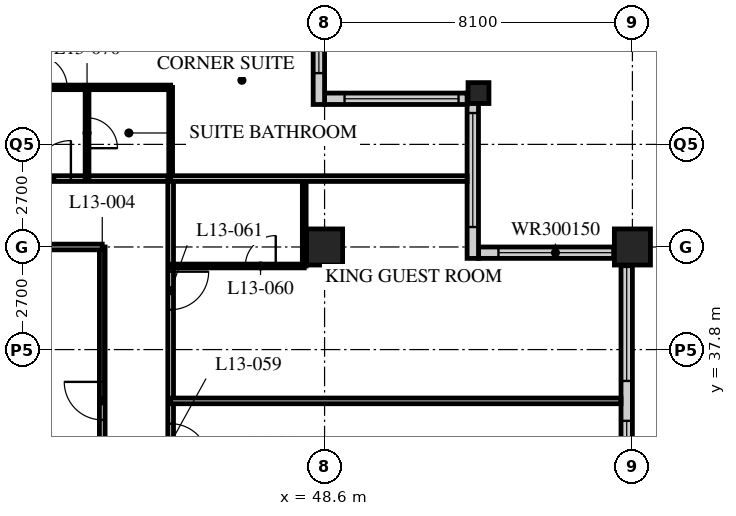
"""IFC4 building model, lengths in metres.
Left out: names, types, materials, properties, quantities, classifications, styles, units other than length and angle.
Written with IfcOpenShell. Run it as: python <this file> out.ifc"""

import sys

from ifc_helpers import new_model, si_unit, direction, frame, frame_2d, origin, origin_2d, place, context, subcontext, project, spatial, rectangle, hollow_rectangle, extrude, element, fill, save


model = new_model("IFC4")
c1 = context("Model", 3, precision=1e-05, world=origin(), true_north=direction((0.0, 1.0)))
c2 = subcontext(c1, "Body", "Model", "MODEL_VIEW")
j1 = project(units=[si_unit("LENGTHUNIT", "METRE"), si_unit("PLANEANGLEUNIT", "RADIAN")], contexts=[c1])
p1 = place(None, origin())
s1 = spatial("IfcSite", under=j1, at=p1, CompositionType="ELEMENT")
p2 = place(p1, origin())
s2 = spatial("IfcBuilding", under=s1, at=p2, CompositionType="ELEMENT")
p3 = place(p2, frame((0.0, 0.0, 56.8)))
s3 = spatial("IfcBuildingStorey", under=s2, at=p3, CompositionType="ELEMENT", Elevation=56.8)
p4 = place(p3, frame((48.6, 40.5, 0.0), z_axis=(0.0, 0.0, 1.0), x_axis=(1.0, 0.0, 0.0)))
e1 = element("IfcColumn", 1, at=p4, inside=s3, PredefinedType="COLUMN", context=c2, shape_type="SweptSolid", body=[
    extrude(hollow_rectangle(XDim=0.95, YDim=0.95, WallThickness=0.095, at=origin_2d()), origin(), (0.0, 0.0, 1.0), 3.4),
])
p5 = place(p3, frame((52.65, 44.55, 0.0), z_axis=(0.0, 0.0, 1.0), x_axis=(1.0, 0.0, 0.0)))
e2 = element("IfcColumn", 2, at=p5, inside=s3, PredefinedType="COLUMN", context=c2, shape_type="SweptSolid", body=[
    extrude(hollow_rectangle(XDim=0.55, YDim=0.55, WallThickness=0.05, at=origin_2d()), origin(), (0.0, 0.0, 1.0), 3.4),
])
p6 = place(p3, frame((56.7, 40.5, 0.0), z_axis=(0.0, 0.0, 1.0), x_axis=(1.0, 0.0, 0.0)))
e3 = element("IfcColumn", 3, at=p6, inside=s3, PredefinedType="COLUMN", context=c2, shape_type="SweptSolid", body=[
    extrude(hollow_rectangle(XDim=0.95, YDim=0.95, WallThickness=0.095, at=origin_2d()), origin(), (0.0, 0.0, 1.0), 3.4),
])
p7 = place(p3, frame((56.55, 8.4, 0.0), z_axis=(0.0, 0.0, 1.0), x_axis=(0.0, 1.0, 0.0)))
e4 = element("IfcWall", 4, at=p7, inside=s3, PredefinedType="SOLIDWALL", context=c2, shape_type="SweptSolid", body=[
    extrude(rectangle(XDim=32.1, YDim=0.3, at=frame_2d((16.05, 0.0))), origin(), (0.0, 0.0, 1.0), 3.19),
])
p8 = place(p7, frame((0.225, 0.0, 0.9)))
e5 = element("IfcOpeningElement", 5, at=p8, cuts=e4, PredefinedType="OPENING", context=c2, shape_type="SweptSolid", body=[
    extrude(rectangle(XDim=3.0, YDim=2.0, at=frame_2d((1.5, 1.0))), frame((0.0, 0.16, 0.0), z_axis=(0.0, -1.0, 0.0), x_axis=(1.0, 0.0, 0.0)), (0.0, 0.0, 1.0), 0.32),
])
p9 = place(p7, frame((4.275, 0.0, 0.9)))
e6 = element("IfcOpeningElement", 6, at=p9, cuts=e4, PredefinedType="OPENING", context=c2, shape_type="SweptSolid", body=[
    extrude(rectangle(XDim=3.0, YDim=2.0, at=frame_2d((1.5, 1.0))), frame((0.0, 0.16, 0.0), z_axis=(0.0, -1.0, 0.0), x_axis=(1.0, 0.0, 0.0)), (0.0, 0.0, 1.0), 0.32),
])
p10 = place(p7, frame((8.325, 0.0, 0.9)))
e7 = element("IfcOpeningElement", 7, at=p10, cuts=e4, PredefinedType="OPENING", context=c2, shape_type="SweptSolid", body=[
    extrude(rectangle(XDim=3.0, YDim=2.0, at=frame_2d((1.5, 1.0))), frame((0.0, 0.16, 0.0), z_axis=(0.0, -1.0, 0.0), x_axis=(1.0, 0.0, 0.0)), (0.0, 0.0, 1.0), 0.32),
])
p11 = place(p7, frame((12.375, 0.0, 0.9)))
e8 = element("IfcOpeningElement", 8, at=p11, cuts=e4, PredefinedType="OPENING", context=c2, shape_type="SweptSolid", body=[
    extrude(rectangle(XDim=3.0, YDim=2.0, at=frame_2d((1.5, 1.0))), frame((0.0, 0.16, 0.0), z_axis=(0.0, -1.0, 0.0), x_axis=(1.0, 0.0, 0.0)), (0.0, 0.0, 1.0), 0.32),
])
p12 = place(p7, frame((16.425, 0.0, 0.9)))
e9 = element("IfcOpeningElement", 9, at=p12, cuts=e4, PredefinedType="OPENING", context=c2, shape_type="SweptSolid", body=[
    extrude(rectangle(XDim=3.0, YDim=2.0, at=frame_2d((1.5, 1.0))), frame((0.0, 0.16, 0.0), z_axis=(0.0, -1.0, 0.0), x_axis=(1.0, 0.0, 0.0)), (0.0, 0.0, 1.0), 0.32),
])
p13 = place(p7, frame((20.475, 0.0, 0.9)))
e10 = element("IfcOpeningElement", 10, at=p13, cuts=e4, PredefinedType="OPENING", context=c2, shape_type="SweptSolid", body=[
    extrude(rectangle(XDim=3.0, YDim=2.0, at=frame_2d((1.5, 1.0))), frame((0.0, 0.16, 0.0), z_axis=(0.0, -1.0, 0.0), x_axis=(1.0, 0.0, 0.0)), (0.0, 0.0, 1.0), 0.32),
])
p14 = place(p7, frame((24.525, 0.0, 0.9)))
e11 = element("IfcOpeningElement", 11, at=p14, cuts=e4, PredefinedType="OPENING", context=c2, shape_type="SweptSolid", body=[
    extrude(rectangle(XDim=3.0, YDim=2.0, at=frame_2d((1.5, 1.0))), frame((0.0, 0.16, 0.0), z_axis=(0.0, -1.0, 0.0), x_axis=(1.0, 0.0, 0.0)), (0.0, 0.0, 1.0), 0.32),
])
p15 = place(p7, frame((28.575, 0.0, 0.9)))
e12 = element("IfcOpeningElement", 12, at=p15, cuts=e4, PredefinedType="OPENING", context=c2, shape_type="SweptSolid", body=[
    extrude(rectangle(XDim=3.0, YDim=2.0, at=frame_2d((1.5, 1.0))), frame((0.0, 0.16, 0.0), z_axis=(0.0, -1.0, 0.0), x_axis=(1.0, 0.0, 0.0)), (0.0, 0.0, 1.0), 0.32),
])
p16 = place(p3, frame((56.4, 40.35, 0.0), z_axis=(0.0, 0.0, 1.0), x_axis=(-1.0, 0.0, 0.0)))
e13 = element("IfcWall", 13, at=p16, inside=s3, PredefinedType="SOLIDWALL", context=c2, shape_type="SweptSolid", body=[
    extrude(rectangle(XDim=3.75, YDim=0.3, at=frame_2d((1.875, 0.0))), origin(), (0.0, 0.0, 1.0), 3.19),
])
p17 = place(p16, frame((0.225, 0.0, 0.9)))
e14 = element("IfcOpeningElement", 14, at=p17, cuts=e13, PredefinedType="OPENING", context=c2, shape_type="SweptSolid", body=[
    extrude(rectangle(XDim=3.0, YDim=1.5, at=frame_2d((1.5, 0.75))), frame((0.0, 0.16, 0.0), z_axis=(0.0, -1.0, 0.0), x_axis=(1.0, 0.0, 0.0)), (0.0, 0.0, 1.0), 0.32),
])
p18 = place(p3, frame((52.5, 40.2, 0.0), z_axis=(0.0, 0.0, 1.0), x_axis=(0.0, 1.0, 0.0)))
e15 = element("IfcWall", 15, at=p18, inside=s3, PredefinedType="SOLIDWALL", context=c2, shape_type="SweptSolid", body=[
    extrude(rectangle(XDim=4.35, YDim=0.3, at=frame_2d((2.175, 0.0))), origin(), (0.0, 0.0, 1.0), 3.19),
])
p19 = place(p18, frame((0.825, 0.0, 0.9)))
e16 = element("IfcOpeningElement", 16, at=p19, cuts=e15, PredefinedType="OPENING", context=c2, shape_type="SweptSolid", body=[
    extrude(rectangle(XDim=3.0, YDim=1.5, at=frame_2d((1.5, 0.75))), frame((0.0, 0.16, 0.0), z_axis=(0.0, -1.0, 0.0), x_axis=(1.0, 0.0, 0.0)), (0.0, 0.0, 1.0), 0.32),
])
p20 = place(p3, frame((52.35, 44.4, 0.0), z_axis=(0.0, 0.0, 1.0), x_axis=(-1.0, 0.0, 0.0)))
e17 = element("IfcWall", 17, at=p20, inside=s3, PredefinedType="SOLIDWALL", context=c2, shape_type="SweptSolid", body=[
    extrude(rectangle(XDim=3.75, YDim=0.3, at=frame_2d((1.875, 0.0))), origin(), (0.0, 0.0, 1.0), 3.19),
])
p21 = place(p20, frame((0.225, 0.0, 0.9)))
e18 = element("IfcOpeningElement", 18, at=p21, cuts=e17, PredefinedType="OPENING", context=c2, shape_type="SweptSolid", body=[
    extrude(rectangle(XDim=3.0, YDim=1.5, at=frame_2d((1.5, 0.75))), frame((0.0, 0.16, 0.0), z_axis=(0.0, -1.0, 0.0), x_axis=(1.0, 0.0, 0.0)), (0.0, 0.0, 1.0), 0.32),
])
p22 = place(p3, frame((48.45, 44.25, 0.0), z_axis=(0.0, 0.0, 1.0), x_axis=(0.0, 1.0, 0.0)))
e19 = element("IfcWall", 19, at=p22, inside=s3, PredefinedType="SOLIDWALL", context=c2, shape_type="SweptSolid", body=[
    extrude(rectangle(XDim=4.35, YDim=0.3, at=frame_2d((2.175, 0.0))), origin(), (0.0, 0.0, 1.0), 3.19),
])
p23 = place(p22, frame((0.825, 0.0, 0.9)))
e20 = element("IfcOpeningElement", 20, at=p23, cuts=e19, PredefinedType="OPENING", context=c2, shape_type="SweptSolid", body=[
    extrude(rectangle(XDim=3.0, YDim=1.5, at=frame_2d((1.5, 0.75))), frame((0.0, 0.16, 0.0), z_axis=(0.0, -1.0, 0.0), x_axis=(1.0, 0.0, 0.0)), (0.0, 0.0, 1.0), 0.32),
])
p24 = place(p3, frame((12.15, 42.3, 0.0), z_axis=(0.0, 0.0, 1.0), x_axis=(1.0, 0.0, 0.0)))
e21 = element("IfcWall", 21, at=p24, inside=s3, PredefinedType="PARTITIONING", context=c2, shape_type="SweptSolid", body=[
    extrude(rectangle(XDim=32.4, YDim=0.15, at=frame_2d((16.2, 0.0))), origin(), (0.0, 0.0, 1.0), 3.19),
])
p25 = place(p24, frame((6.5, 0.0, 0.0)))
e22 = element("IfcOpeningElement", 22, at=p25, cuts=e21, PredefinedType="OPENING", context=c2, shape_type="SweptSolid", body=[
    extrude(rectangle(XDim=1.0, YDim=2.1, at=frame_2d((0.5, 1.05))), frame((0.0, 0.085, 0.0), z_axis=(0.0, -1.0, 0.0), x_axis=(1.0, 0.0, 0.0)), (0.0, 0.0, 1.0), 0.17),
])
p26 = place(p24, frame((10.55, 0.0, 0.0)))
e23 = element("IfcOpeningElement", 23, at=p26, cuts=e21, PredefinedType="OPENING", context=c2, shape_type="SweptSolid", body=[
    extrude(rectangle(XDim=1.0, YDim=2.1, at=frame_2d((0.5, 1.05))), frame((0.0, 0.085, 0.0), z_axis=(0.0, -1.0, 0.0), x_axis=(1.0, 0.0, 0.0)), (0.0, 0.0, 1.0), 0.17),
])
p27 = place(p24, frame((14.6, 0.0, 0.0)))
e24 = element("IfcOpeningElement", 24, at=p27, cuts=e21, PredefinedType="OPENING", context=c2, shape_type="SweptSolid", body=[
    extrude(rectangle(XDim=1.0, YDim=2.1, at=frame_2d((0.5, 1.05))), frame((0.0, 0.085, 0.0), z_axis=(0.0, -1.0, 0.0), x_axis=(1.0, 0.0, 0.0)), (0.0, 0.0, 1.0), 0.17),
])
p28 = place(p24, frame((18.65, 0.0, 0.0)))
e25 = element("IfcOpeningElement", 25, at=p28, cuts=e21, PredefinedType="OPENING", context=c2, shape_type="SweptSolid", body=[
    extrude(rectangle(XDim=1.0, YDim=2.1, at=frame_2d((0.5, 1.05))), frame((0.0, 0.085, 0.0), z_axis=(0.0, -1.0, 0.0), x_axis=(1.0, 0.0, 0.0)), (0.0, 0.0, 1.0), 0.17),
])
p29 = place(p24, frame((22.7, 0.0, 0.0)))
e26 = element("IfcOpeningElement", 26, at=p29, cuts=e21, PredefinedType="OPENING", context=c2, shape_type="SweptSolid", body=[
    extrude(rectangle(XDim=1.0, YDim=2.1, at=frame_2d((0.5, 1.05))), frame((0.0, 0.085, 0.0), z_axis=(0.0, -1.0, 0.0), x_axis=(1.0, 0.0, 0.0)), (0.0, 0.0, 1.0), 0.17),
])
p30 = place(p24, frame((26.75, 0.0, 0.0)))
e27 = element("IfcOpeningElement", 27, at=p30, cuts=e21, PredefinedType="OPENING", context=c2, shape_type="SweptSolid", body=[
    extrude(rectangle(XDim=1.0, YDim=2.1, at=frame_2d((0.5, 1.05))), frame((0.0, 0.085, 0.0), z_axis=(0.0, -1.0, 0.0), x_axis=(1.0, 0.0, 0.0)), (0.0, 0.0, 1.0), 0.17),
])
p31 = place(p24, frame((28.775, 0.0, 0.0)))
e28 = element("IfcOpeningElement", 28, at=p31, cuts=e21, PredefinedType="OPENING", context=c2, shape_type="SweptSolid", body=[
    extrude(rectangle(XDim=1.0, YDim=2.1, at=frame_2d((0.5, 1.05))), frame((0.0, 0.085, 0.0), z_axis=(0.0, -1.0, 0.0), x_axis=(1.0, 0.0, 0.0)), (0.0, 0.0, 1.0), 0.17),
])
p32 = place(p24, frame((2.625, 0.0, 0.0)))
e29 = element("IfcOpeningElement", 29, at=p32, cuts=e21, PredefinedType="OPENING", context=c2, shape_type="SweptSolid", body=[
    extrude(rectangle(XDim=1.0, YDim=2.1, at=frame_2d((0.5, 1.05))), frame((0.0, 0.085, 0.0), z_axis=(0.0, -1.0, 0.0), x_axis=(1.0, 0.0, 0.0)), (0.0, 0.0, 1.0), 0.17),
])
p33 = place(p3, frame((44.55, 12.15, 0.0), z_axis=(0.0, 0.0, 1.0), x_axis=(0.0, 1.0, 0.0)))
e30 = element("IfcWall", 30, at=p33, inside=s3, PredefinedType="PARTITIONING", context=c2, shape_type="SweptSolid", body=[
    extrude(rectangle(XDim=30.15, YDim=0.15, at=frame_2d((15.075, 0.0))), origin(), (0.0, 0.0, 1.0), 3.19),
])
p34 = place(p33, frame((2.75, 0.0, 0.0)))
e31 = element("IfcOpeningElement", 31, at=p34, cuts=e30, PredefinedType="OPENING", context=c2, shape_type="SweptSolid", body=[
    extrude(rectangle(XDim=1.0, YDim=2.1, at=frame_2d((0.5, 1.05))), frame((0.0, 0.085, 0.0), z_axis=(0.0, -1.0, 0.0), x_axis=(1.0, 0.0, 0.0)), (0.0, 0.0, 1.0), 0.17),
])
p35 = place(p33, frame((6.5, 0.0, 0.0)))
e32 = element("IfcOpeningElement", 32, at=p35, cuts=e30, PredefinedType="OPENING", context=c2, shape_type="SweptSolid", body=[
    extrude(rectangle(XDim=1.0, YDim=2.1, at=frame_2d((0.5, 1.05))), frame((0.0, 0.085, 0.0), z_axis=(0.0, -1.0, 0.0), x_axis=(1.0, 0.0, 0.0)), (0.0, 0.0, 1.0), 0.17),
])
p36 = place(p33, frame((10.55, 0.0, 0.0)))
e33 = element("IfcOpeningElement", 33, at=p36, cuts=e30, PredefinedType="OPENING", context=c2, shape_type="SweptSolid", body=[
    extrude(rectangle(XDim=1.0, YDim=2.1, at=frame_2d((0.5, 1.05))), frame((0.0, 0.085, 0.0), z_axis=(0.0, -1.0, 0.0), x_axis=(1.0, 0.0, 0.0)), (0.0, 0.0, 1.0), 0.17),
])
p37 = place(p33, frame((14.6, 0.0, 0.0)))
e34 = element("IfcOpeningElement", 34, at=p37, cuts=e30, PredefinedType="OPENING", context=c2, shape_type="SweptSolid", body=[
    extrude(rectangle(XDim=1.0, YDim=2.1, at=frame_2d((0.5, 1.05))), frame((0.0, 0.085, 0.0), z_axis=(0.0, -1.0, 0.0), x_axis=(1.0, 0.0, 0.0)), (0.0, 0.0, 1.0), 0.17),
])
p38 = place(p33, frame((18.65, 0.0, 0.0)))
e35 = element("IfcOpeningElement", 35, at=p38, cuts=e30, PredefinedType="OPENING", context=c2, shape_type="SweptSolid", body=[
    extrude(rectangle(XDim=1.0, YDim=2.1, at=frame_2d((0.5, 1.05))), frame((0.0, 0.085, 0.0), z_axis=(0.0, -1.0, 0.0), x_axis=(1.0, 0.0, 0.0)), (0.0, 0.0, 1.0), 0.17),
])
p39 = place(p33, frame((22.7, 0.0, 0.0)))
e36 = element("IfcOpeningElement", 36, at=p39, cuts=e30, PredefinedType="OPENING", context=c2, shape_type="SweptSolid", body=[
    extrude(rectangle(XDim=1.0, YDim=2.1, at=frame_2d((0.5, 1.05))), frame((0.0, 0.085, 0.0), z_axis=(0.0, -1.0, 0.0), x_axis=(1.0, 0.0, 0.0)), (0.0, 0.0, 1.0), 0.17),
])
p40 = place(p33, frame((26.7, 0.0, 0.0)))
e37 = element("IfcOpeningElement", 37, at=p40, cuts=e30, PredefinedType="OPENING", context=c2, shape_type="SweptSolid", body=[
    extrude(rectangle(XDim=1.0, YDim=2.1, at=frame_2d((0.5, 1.05))), frame((0.0, 0.085, 0.0), z_axis=(0.0, -1.0, 0.0), x_axis=(1.0, 0.0, 0.0)), (0.0, 0.0, 1.0), 0.17),
])
p41 = place(p3, frame((42.75, 13.95, 0.0), z_axis=(0.0, 0.0, 1.0), x_axis=(0.0, 1.0, 0.0)))
e38 = element("IfcWall", 38, at=p41, inside=s3, PredefinedType="PARTITIONING", context=c2, shape_type="SweptSolid", body=[
    extrude(rectangle(XDim=26.55, YDim=0.15, at=frame_2d((13.275, 0.0))), origin(), (0.0, 0.0, 1.0), 3.19),
])
p42 = place(p41, frame((13.9, 0.0, 0.0)))
e39 = element("IfcOpeningElement", 39, at=p42, cuts=e38, PredefinedType="OPENING", context=c2, shape_type="SweptSolid", body=[
    extrude(rectangle(XDim=1.0, YDim=2.1, at=frame_2d((0.5, 1.05))), frame((0.0, 0.085, 0.0), z_axis=(0.0, -1.0, 0.0), x_axis=(1.0, 0.0, 0.0)), (0.0, 0.0, 1.0), 0.17),
])
p43 = place(p41, frame((22.0, 0.0, 0.0)))
e40 = element("IfcOpeningElement", 40, at=p43, cuts=e38, PredefinedType="OPENING", context=c2, shape_type="SweptSolid", body=[
    extrude(rectangle(XDim=1.0, YDim=2.1, at=frame_2d((0.5, 1.05))), frame((0.0, 0.085, 0.0), z_axis=(0.0, -1.0, 0.0), x_axis=(1.0, 0.0, 0.0)), (0.0, 0.0, 1.0), 0.17),
])
p44 = place(p3, frame((42.75, 40.5, 0.0), z_axis=(0.0, 0.0, 1.0), x_axis=(-1.0, 0.0, 0.0)))
e41 = element("IfcWall", 41, at=p44, inside=s3, PredefinedType="PARTITIONING", context=c2, shape_type="SweptSolid", body=[
    extrude(rectangle(XDim=2.05, YDim=0.15, at=frame_2d((1.025, 0.0))), origin(), (0.0, 0.0, 1.0), 2.578),
])
p45 = place(p3, frame((44.55, 36.45, 0.0), z_axis=(0.0, 0.0, 1.0), x_axis=(1.0, 0.0, 0.0)))
e42 = element("IfcWall", 42, at=p45, inside=s3, PredefinedType="PARTITIONING", context=c2, shape_type="SweptSolid", body=[
    extrude(rectangle(XDim=11.85, YDim=0.15, at=frame_2d((5.925, 0.0))), origin(), (0.0, 0.0, 1.0), 3.19),
])
p46 = place(p3, frame((48.065, 40.0, 0.0), z_axis=(0.0, 0.0, 1.0), x_axis=(0.0, 1.0, 0.0)))
e43 = element("IfcWall", 43, at=p46, inside=s3, PredefinedType="PARTITIONING", context=c2, shape_type="SweptSolid", body=[
    extrude(rectangle(XDim=2.3, YDim=0.1, at=frame_2d((1.15, 0.0))), origin(), (0.0, 0.0, 1.0), 3.19),
])
p47 = place(p3, frame((44.55, 40.0, 0.0), z_axis=(0.0, 0.0, 1.0), x_axis=(1.0, 0.0, 0.0)))
e44 = element("IfcWall", 44, at=p47, inside=s3, PredefinedType="PARTITIONING", context=c2, shape_type="SweptSolid", body=[
    extrude(rectangle(XDim=3.515, YDim=0.1, at=frame_2d((1.757, 0.0))), origin(), (0.0, 0.0, 1.0), 3.19),
])
p48 = place(p47, frame((1.965, 0.0, 0.0)))
e45 = element("IfcOpeningElement", 45, at=p48, cuts=e44, PredefinedType="OPENING", context=c2, shape_type="SweptSolid", body=[
    extrude(rectangle(XDim=0.8, YDim=2.1, at=frame_2d((0.4, 1.05))), frame((0.0, 0.06, 0.0), z_axis=(0.0, -1.0, 0.0), x_axis=(1.0, 0.0, 0.0)), (0.0, 0.0, 1.0), 0.12),
])
p49 = place(p3, frame((40.5, 44.7, 0.0), z_axis=(0.0, 0.0, 1.0), x_axis=(1.0, 0.0, 0.0)))
e46 = element("IfcWall", 46, at=p49, inside=s3, PredefinedType="PARTITIONING", context=c2, shape_type="SweptSolid", body=[
    extrude(rectangle(XDim=4.05, YDim=0.12, at=frame_2d((2.025, 0.0))), origin(), (0.0, 0.0, 1.0), 3.19),
])
p50 = place(p49, frame((0.475, 0.0, 0.0)))
e47 = element("IfcOpeningElement", 47, at=p50, cuts=e46, PredefinedType="OPENING", context=c2, shape_type="SweptSolid", body=[
    extrude(rectangle(XDim=0.85, YDim=2.1, at=frame_2d((0.425, 1.05))), frame((0.0, 0.07, 0.0), z_axis=(0.0, -1.0, 0.0), x_axis=(1.0, 0.0, 0.0)), (0.0, 0.0, 1.0), 0.14),
])
p51 = place(p3, frame((42.35, 42.3, 0.0), z_axis=(0.0, 0.0, 1.0), x_axis=(0.0, 1.0, 0.0)))
e48 = element("IfcWall", 48, at=p51, inside=s3, PredefinedType="PARTITIONING", context=c2, shape_type="SweptSolid", body=[
    extrude(rectangle(XDim=2.4, YDim=0.1, at=frame_2d((1.2, 0.0))), origin(), (0.0, 0.0, 1.0), 3.19),
])
p52 = place(p51, frame((0.8, 0.0, 0.0)))
e49 = element("IfcOpeningElement", 49, at=p52, cuts=e48, PredefinedType="OPENING", context=c2, shape_type="SweptSolid", body=[
    extrude(rectangle(XDim=0.8, YDim=2.1, at=frame_2d((0.4, 1.05))), frame((0.0, 0.06, 0.0), z_axis=(0.0, -1.0, 0.0), x_axis=(1.0, 0.0, 0.0)), (0.0, 0.0, 1.0), 0.12),
])
p53 = place(p3, frame((44.55, 42.3, 0.0), z_axis=(0.0, 0.0, 1.0), x_axis=(0.0, 1.0, 0.0)))
e50 = element("IfcWall", 50, at=p53, inside=s3, PredefinedType="PARTITIONING", context=c2, shape_type="SweptSolid", body=[
    extrude(rectangle(XDim=2.4, YDim=0.1, at=frame_2d((1.2, 0.0))), origin(), (0.0, 0.0, 1.0), 3.19),
])
p54 = place(p3, frame((44.55, 42.3, 0.0), z_axis=(0.0, 0.0, 1.0), x_axis=(1.0, 0.0, 0.0)))
e51 = element("IfcWall", 51, at=p54, inside=s3, PredefinedType="PARTITIONING", context=c2, shape_type="SweptSolid", body=[
    extrude(rectangle(XDim=7.8, YDim=0.15, at=frame_2d((3.9, 0.0))), origin(), (0.0, 0.0, 1.0), 3.19),
])
p55 = place(p14, origin())
e52 = element("IfcWindow", 52, at=p55, inside=s3, PartitioningType="SINGLE_PANEL", PredefinedType="WINDOW", context=c2, shape_type="SweptSolid", body=[
    extrude(rectangle(XDim=3.0, YDim=2.0, at=frame_2d((1.5, 1.0))), frame((0.0, 0.03, 0.0), z_axis=(0.0, -1.0, 0.0), x_axis=(1.0, 0.0, 0.0)), (0.0, 0.0, 1.0), 0.06),
])
fill(e11, e52)
p56 = place(p15, origin())
e53 = element("IfcWindow", 53, at=p56, inside=s3, PartitioningType="SINGLE_PANEL", PredefinedType="WINDOW", context=c2, shape_type="SweptSolid", body=[
    extrude(rectangle(XDim=3.0, YDim=2.0, at=frame_2d((1.5, 1.0))), frame((0.0, 0.03, 0.0), z_axis=(0.0, -1.0, 0.0), x_axis=(1.0, 0.0, 0.0)), (0.0, 0.0, 1.0), 0.06),
])
fill(e12, e53)
p57 = place(p17, origin())
e54 = element("IfcWindow", 54, at=p57, inside=s3, PartitioningType="SINGLE_PANEL", PredefinedType="WINDOW", context=c2, shape_type="SweptSolid", body=[
    extrude(rectangle(XDim=3.0, YDim=1.5, at=frame_2d((1.5, 0.75))), frame((0.0, 0.03, 0.0), z_axis=(0.0, -1.0, 0.0), x_axis=(1.0, 0.0, 0.0)), (0.0, 0.0, 1.0), 0.06),
])
fill(e14, e54)
p58 = place(p19, origin())
e55 = element("IfcWindow", 55, at=p58, inside=s3, PartitioningType="SINGLE_PANEL", PredefinedType="WINDOW", context=c2, shape_type="SweptSolid", body=[
    extrude(rectangle(XDim=3.0, YDim=1.5, at=frame_2d((1.5, 0.75))), frame((0.0, 0.03, 0.0), z_axis=(0.0, -1.0, 0.0), x_axis=(1.0, 0.0, 0.0)), (0.0, 0.0, 1.0), 0.06),
])
fill(e16, e55)
p59 = place(p21, origin())
e56 = element("IfcWindow", 56, at=p59, inside=s3, PartitioningType="SINGLE_PANEL", PredefinedType="WINDOW", context=c2, shape_type="SweptSolid", body=[
    extrude(rectangle(XDim=3.0, YDim=1.5, at=frame_2d((1.5, 0.75))), frame((0.0, 0.03, 0.0), z_axis=(0.0, -1.0, 0.0), x_axis=(1.0, 0.0, 0.0)), (0.0, 0.0, 1.0), 0.06),
])
fill(e18, e56)
p60 = place(p23, origin())
e57 = element("IfcWindow", 57, at=p60, inside=s3, PartitioningType="SINGLE_PANEL", PredefinedType="WINDOW", context=c2, shape_type="SweptSolid", body=[
    extrude(rectangle(XDim=3.0, YDim=1.5, at=frame_2d((1.5, 0.75))), frame((0.0, 0.03, 0.0), z_axis=(0.0, -1.0, 0.0), x_axis=(1.0, 0.0, 0.0)), (0.0, 0.0, 1.0), 0.06),
])
fill(e20, e57)
p61 = place(p43, origin())
e58 = element("IfcDoor", 58, at=p61, inside=s3, OperationType="SINGLE_SWING_RIGHT", PredefinedType="DOOR", context=c2, shape_type="SweptSolid", body=[
    extrude(rectangle(XDim=1.0, YDim=2.1, at=frame_2d((0.5, 1.05))), frame((0.0, 0.025, 0.0), z_axis=(0.0, -1.0, 0.0), x_axis=(1.0, 0.0, 0.0)), (0.0, 0.0, 1.0), 0.05),
])
fill(e40, e58)
p62 = place(p39, origin())
e59 = element("IfcDoor", 59, at=p62, inside=s3, OperationType="SINGLE_SWING_RIGHT", PredefinedType="DOOR", context=c2, shape_type="SweptSolid", body=[
    extrude(rectangle(XDim=1.0, YDim=2.1, at=frame_2d((0.5, 1.05))), frame((0.0, 0.025, 0.0), z_axis=(0.0, -1.0, 0.0), x_axis=(1.0, 0.0, 0.0)), (0.0, 0.0, 1.0), 0.05),
])
fill(e36, e59)
p63 = place(p48, origin())
e60 = element("IfcDoor", 60, at=p63, inside=s3, OperationType="SINGLE_SWING_RIGHT", PredefinedType="DOOR", context=c2, shape_type="SweptSolid", body=[
    extrude(rectangle(XDim=0.8, YDim=2.1, at=frame_2d((0.4, 1.05))), frame((0.0, 0.025, 0.0), z_axis=(0.0, -1.0, 0.0), x_axis=(1.0, 0.0, 0.0)), (0.0, 0.0, 1.0), 0.05),
])
fill(e45, e60)
p64 = place(p40, origin())
e61 = element("IfcDoor", 61, at=p64, inside=s3, OperationType="SINGLE_SWING_LEFT", PredefinedType="DOOR", context=c2, shape_type="SweptSolid", body=[
    extrude(rectangle(XDim=1.0, YDim=2.1, at=frame_2d((0.5, 1.05))), frame((0.0, 0.025, 0.0), z_axis=(0.0, -1.0, 0.0), x_axis=(1.0, 0.0, 0.0)), (0.0, 0.0, 1.0), 0.05),
])
fill(e37, e61)
p65 = place(p52, origin())
e62 = element("IfcDoor", 62, at=p65, inside=s3, OperationType="SINGLE_SWING_RIGHT", PredefinedType="DOOR", context=c2, shape_type="SweptSolid", body=[
    extrude(rectangle(XDim=0.8, YDim=2.1, at=frame_2d((0.4, 1.05))), frame((0.0, 0.025, 0.0), z_axis=(0.0, -1.0, 0.0), x_axis=(1.0, 0.0, 0.0)), (0.0, 0.0, 1.0), 0.05),
])
fill(e49, e62)
p66 = place(p31, origin())
e63 = element("IfcDoor", 63, at=p66, inside=s3, OperationType="SINGLE_SWING_RIGHT", PredefinedType="DOOR", context=c2, shape_type="SweptSolid", body=[
    extrude(rectangle(XDim=1.0, YDim=2.1, at=frame_2d((0.5, 1.05))), frame((0.0, 0.025, 0.0), z_axis=(0.0, -1.0, 0.0), x_axis=(1.0, 0.0, 0.0)), (0.0, 0.0, 1.0), 0.05),
])
fill(e28, e63)
p67 = place(p50, origin())
e64 = element("IfcDoor", 64, at=p67, inside=s3, OperationType="SINGLE_SWING_LEFT", PredefinedType="DOOR", context=c2, shape_type="SweptSolid", body=[
    extrude(rectangle(XDim=0.85, YDim=2.1, at=frame_2d((0.425, 1.05))), frame((0.0, 0.025, 0.0), z_axis=(0.0, -1.0, 0.0), x_axis=(1.0, 0.0, 0.0)), (0.0, 0.0, 1.0), 0.05),
])
fill(e47, e64)
save(model, sys.argv[1])
